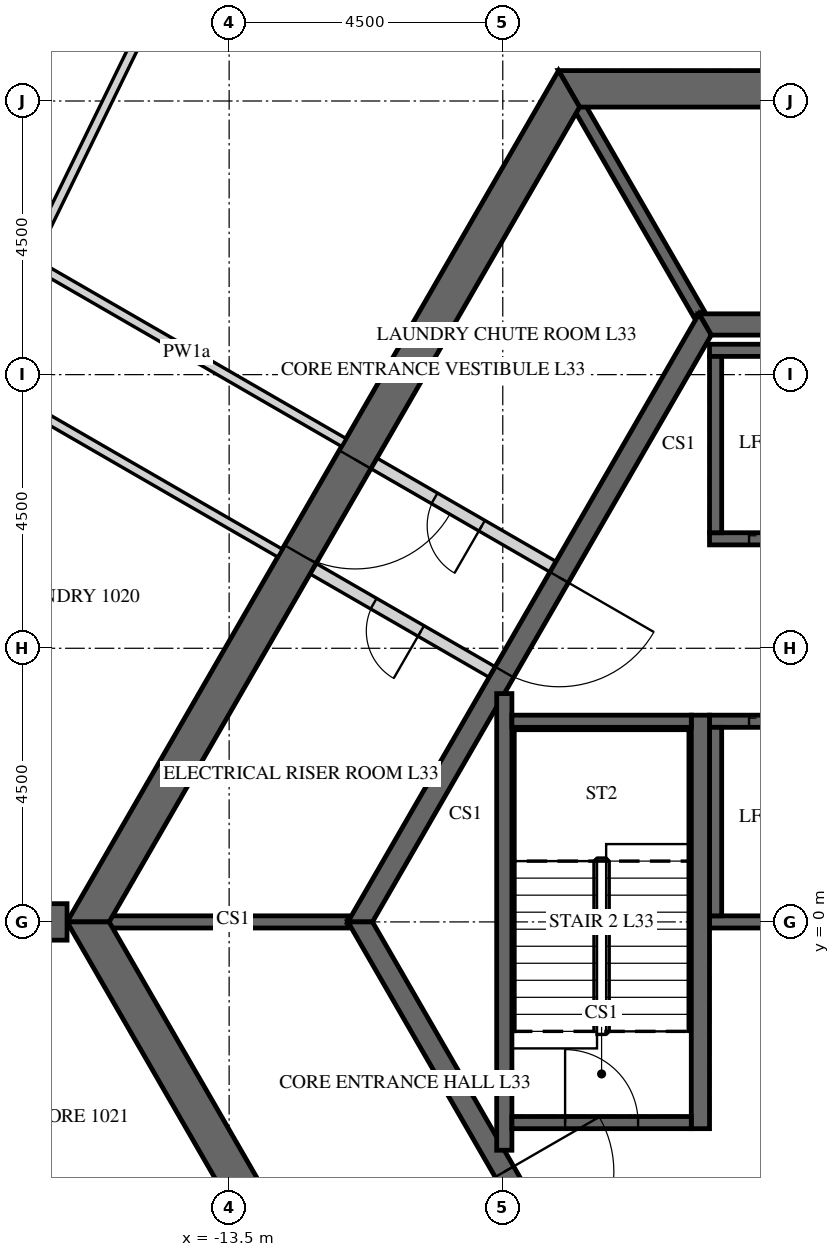
"""IFC4 building model, lengths in metres.
Left out: names, types, materials, properties, quantities, classifications, styles, units other than length and angle.
Written with IfcOpenShell. Run it as: python <this file> out.ifc"""

import sys

from ifc_helpers import new_model, si_unit, direction, frame, frame_2d, origin, place, context, subcontext, project, spatial, polyline, rectangle, outline, extrude, element, fill, save


model = new_model("IFC4")
c1 = context("Model", 3, precision=1e-05, world=origin(), true_north=direction((0.0, 1.0)))
c2 = subcontext(c1, "Body", "Model", "MODEL_VIEW")
j1 = project(units=[si_unit("LENGTHUNIT", "METRE"), si_unit("PLANEANGLEUNIT", "RADIAN")], contexts=[c1])
p1 = place(None, origin())
s1 = spatial("IfcSite", under=j1, at=p1, CompositionType="ELEMENT")
p2 = place(p1, origin())
s2 = spatial("IfcBuilding", under=s1, at=p2, CompositionType="ELEMENT")
p3 = place(p2, frame((0.0, 0.0, 142.8)))
s3 = spatial("IfcBuildingStorey", under=s2, at=p3, CompositionType="ELEMENT", Elevation=142.8)
p4 = place(p3, frame((-7.91, 13.7, -0.15), z_axis=(0.0, 0.0, 1.0), x_axis=(-0.499999880136, -0.866025472988, 0.0)))
e1 = element("IfcWall", 1, at=p4, inside=s3, PredefinedType="SHEAR", context=c2, shape_type="SweptSolid", body=[
    extrude(outline(polyline([(-0.173, -0.3), (15.993, -0.3), (15.646, 0.3), (0.173, 0.3), (-0.173, -0.3)])), origin(), (0.0, 0.0, 1.0), 3.75),
])
p5 = place(p4, frame((7.039, 0.0, 0.15)))
e2 = element("IfcOpeningElement", 2, at=p5, cuts=e1, PredefinedType="OPENING", context=c2, shape_type="SweptSolid", body=[
    extrude(rectangle(XDim=1.8, YDim=2.4, at=frame_2d((0.9, 1.2))), frame((0.0, 0.31, 0.0), z_axis=(0.0, -1.0, 0.0), x_axis=(1.0, 0.0, 0.0)), (0.0, 0.0, 1.0), 0.62),
])
p6 = place(p3, frame((-15.819, 0.0, -0.15), z_axis=(0.0, 0.0, 1.0), x_axis=(0.499999880136, -0.866025472988, 0.0)))
e3 = element("IfcWall", 3, at=p6, inside=s3, PredefinedType="SHEAR", context=c2, shape_type="SweptSolid", body=[
    extrude(outline(polyline([(-0.173, -0.3), (15.993, -0.3), (15.646, 0.3), (0.173, 0.3), (-0.173, -0.3)])), origin(), (0.0, 0.0, 1.0), 3.75),
])
p7 = place(p6, frame((6.981, 0.0, 0.15)))
e4 = element("IfcOpeningElement", 4, at=p7, cuts=e3, PredefinedType="OPENING", context=c2, shape_type="SweptSolid", body=[
    extrude(rectangle(XDim=1.8, YDim=2.4, at=frame_2d((0.9, 1.2))), frame((0.0, 0.31, 0.0), z_axis=(0.0, -1.0, 0.0), x_axis=(1.0, 0.0, 0.0)), (0.0, 0.0, 1.0), 0.62),
])
p8 = place(p3, frame((7.91, 13.7, -0.15), z_axis=(0.0, 0.0, 1.0), x_axis=(-1.0, 0.0, 0.0)))
e5 = element("IfcWall", 5, at=p8, inside=s3, PredefinedType="SHEAR", context=c2, shape_type="SweptSolid", body=[
    extrude(outline(polyline([(-0.173, -0.3), (15.993, -0.3), (15.646, 0.3), (0.173, 0.3), (-0.173, -0.3)])), origin(), (0.0, 0.0, 1.0), 3.75),
])
p9 = place(p8, frame((7.31, 0.0, 0.15)))
e6 = element("IfcOpeningElement", 6, at=p9, cuts=e5, PredefinedType="OPENING", context=c2, shape_type="SweptSolid", body=[
    extrude(rectangle(XDim=1.2, YDim=2.4, at=frame_2d((0.6, 1.2))), frame((0.0, 0.31, 0.0), z_axis=(0.0, -1.0, 0.0), x_axis=(1.0, 0.0, 0.0)), (0.0, 0.0, 1.0), 0.62),
])
p10 = place(p3, frame((-16.166, 0.0, -0.15), z_axis=(0.0, 0.0, 1.0), x_axis=(-1.0, 0.0, 0.0)))
e7 = element("IfcWall", 7, at=p10, inside=s3, PredefinedType="SHEAR", context=c2, shape_type="SweptSolid", body=[
    extrude(rectangle(XDim=16.509, YDim=0.6, at=frame_2d((8.254, 0.0))), origin(), (0.0, 0.0, 1.0), 3.75),
])
p11 = place(p10, frame((7.354, 0.0, 0.15)))
e8 = element("IfcOpeningElement", 8, at=p11, cuts=e7, PredefinedType="OPENING", context=c2, shape_type="SweptSolid", body=[
    extrude(rectangle(XDim=1.8, YDim=2.4, at=frame_2d((0.9, 1.2))), frame((0.0, 0.31, 0.0), z_axis=(0.0, -1.0, 0.0), x_axis=(1.0, 0.0, 0.0)), (0.0, 0.0, 1.0), 0.62),
])
p12 = place(p3, frame((-5.673, 9.825, -0.15), z_axis=(0.0, 0.0, 1.0), x_axis=(-0.499995046907, -0.866028263435, 0.0)))
e9 = element("IfcWall", 9, at=p12, inside=s3, PredefinedType="SHEAR", context=c2, shape_type="SweptSolid", body=[
    extrude(outline(polyline([(-0.101, -0.175), (11.446, -0.175), (11.244, 0.175), (0.101, 0.175), (-0.101, -0.175)])), origin(), (0.0, 0.0, 1.0), 3.75),
])
p13 = place(p12, frame((4.801, 0.0, 0.15)))
e10 = element("IfcOpeningElement", 10, at=p13, cuts=e9, PredefinedType="OPENING", context=c2, shape_type="SweptSolid", body=[
    extrude(rectangle(XDim=1.8, YDim=2.4, at=frame_2d((0.9, 1.2))), frame((0.0, 0.185, 0.0), z_axis=(0.0, -1.0, 0.0), x_axis=(1.0, 0.0, 0.0)), (0.0, 0.0, 1.0), 0.37),
])
p14 = place(p3, frame((-11.345, 0.0, -0.15), z_axis=(0.0, 0.0, 1.0), x_axis=(0.499995046907, -0.866028263435, 0.0)))
e11 = element("IfcWall", 11, at=p14, inside=s3, PredefinedType="SHEAR", context=c2, shape_type="SweptSolid", body=[
    extrude(outline(polyline([(-0.101, -0.175), (11.446, -0.175), (11.244, 0.175), (0.101, 0.175), (-0.101, -0.175)])), origin(), (0.0, 0.0, 1.0), 3.75),
])
p15 = place(p14, frame((4.744, 0.0, 0.15)))
e12 = element("IfcOpeningElement", 12, at=p15, cuts=e11, PredefinedType="OPENING", context=c2, shape_type="SweptSolid", body=[
    extrude(rectangle(XDim=1.8, YDim=2.4, at=frame_2d((0.9, 1.2))), frame((0.0, 0.185, 0.0), z_axis=(0.0, -1.0, 0.0), x_axis=(1.0, 0.0, 0.0)), (0.0, 0.0, 1.0), 0.37),
])
p16 = place(p3, frame((5.673, 9.825, -0.15), z_axis=(0.0, 0.0, 1.0), x_axis=(-1.0, 0.0, 0.0)))
e13 = element("IfcWall", 13, at=p16, inside=s3, PredefinedType="SHEAR", context=c2, shape_type="SweptSolid", body=[
    extrude(outline(polyline([(-0.101, -0.175), (11.446, -0.175), (11.244, 0.175), (0.101, 0.175), (-0.101, -0.175)])), origin(), (0.0, 0.0, 1.0), 3.75),
])
p17 = place(p3, frame((-5.6, 6.3, -0.25), z_axis=(0.0, 0.0, 1.0), x_axis=(1.0, 0.0, 0.0)))
e14 = element("IfcWall", 14, at=p17, inside=s3, PredefinedType="SHEAR", context=c2, shape_type="SweptSolid", body=[
    extrude(rectangle(XDim=11.2, YDim=0.2, at=frame_2d((5.6, 0.0))), origin(), (0.0, 0.0, 1.0), 3.9),
])
p18 = place(p17, frame((0.65, 0.0, 0.25)))
e15 = element("IfcOpeningElement", 15, at=p18, cuts=e14, PredefinedType="OPENING", context=c2, shape_type="SweptSolid", body=[
    extrude(rectangle(XDim=1.1, YDim=2.1, at=frame_2d((0.55, 1.05))), frame((0.0, 0.11, 0.0), z_axis=(0.0, -1.0, 0.0), x_axis=(1.0, 0.0, 0.0)), (0.0, 0.0, 1.0), 0.22),
])
p19 = place(p17, frame((2.85, 0.0, 0.25)))
e16 = element("IfcOpeningElement", 16, at=p19, cuts=e14, PredefinedType="OPENING", context=c2, shape_type="SweptSolid", body=[
    extrude(rectangle(XDim=1.1, YDim=2.1, at=frame_2d((0.55, 1.05))), frame((0.0, 0.11, 0.0), z_axis=(0.0, -1.0, 0.0), x_axis=(1.0, 0.0, 0.0)), (0.0, 0.0, 1.0), 0.22),
])
p20 = place(p17, frame((5.05, 0.0, 0.25)))
e17 = element("IfcOpeningElement", 17, at=p20, cuts=e14, PredefinedType="OPENING", context=c2, shape_type="SweptSolid", body=[
    extrude(rectangle(XDim=1.1, YDim=2.1, at=frame_2d((0.55, 1.05))), frame((0.0, 0.11, 0.0), z_axis=(0.0, -1.0, 0.0), x_axis=(1.0, 0.0, 0.0)), (0.0, 0.0, 1.0), 0.22),
])
p21 = place(p17, frame((7.25, 0.0, 0.25)))
e18 = element("IfcOpeningElement", 18, at=p21, cuts=e14, PredefinedType="OPENING", context=c2, shape_type="SweptSolid", body=[
    extrude(rectangle(XDim=1.1, YDim=2.1, at=frame_2d((0.55, 1.05))), frame((0.0, 0.11, 0.0), z_axis=(0.0, -1.0, 0.0), x_axis=(1.0, 0.0, 0.0)), (0.0, 0.0, 1.0), 0.22),
])
p22 = place(p17, frame((9.45, 0.0, 0.25)))
e19 = element("IfcOpeningElement", 19, at=p22, cuts=e14, PredefinedType="OPENING", context=c2, shape_type="SweptSolid", body=[
    extrude(rectangle(XDim=1.1, YDim=2.1, at=frame_2d((0.55, 1.05))), frame((0.0, 0.11, 0.0), z_axis=(0.0, -1.0, 0.0), x_axis=(1.0, 0.0, 0.0)), (0.0, 0.0, 1.0), 0.22),
])
p23 = place(p3, frame((-5.6, 9.4, -0.25), z_axis=(0.0, 0.0, 1.0), x_axis=(1.0, 0.0, 0.0)))
e20 = element("IfcWall", 20, at=p23, inside=s3, PredefinedType="SHEAR", context=c2, shape_type="SweptSolid", body=[
    extrude(rectangle(XDim=11.2, YDim=0.2, at=frame_2d((5.6, 0.0))), origin(), (0.0, 0.0, 1.0), 3.9),
])
p24 = place(p3, frame((-5.5, 6.4, -0.25), z_axis=(0.0, 0.0, 1.0), x_axis=(0.0, 1.0, 0.0)))
e21 = element("IfcWall", 21, at=p24, inside=s3, PredefinedType="SHEAR", context=c2, shape_type="SweptSolid", body=[
    extrude(rectangle(XDim=2.9, YDim=0.2, at=frame_2d((1.45, 0.0))), origin(), (0.0, 0.0, 1.0), 3.9),
])
p25 = place(p3, frame((-5.6, 3.3, -0.25), z_axis=(0.0, 0.0, 1.0), x_axis=(1.0, 0.0, 0.0)))
e22 = element("IfcWall", 22, at=p25, inside=s3, PredefinedType="SHEAR", context=c2, shape_type="SweptSolid", body=[
    extrude(rectangle(XDim=11.2, YDim=0.2, at=frame_2d((5.6, 0.0))), origin(), (0.0, 0.0, 1.0), 3.9),
])
p26 = place(p25, frame((0.65, 0.0, 0.25)))
e23 = element("IfcOpeningElement", 23, at=p26, cuts=e22, PredefinedType="OPENING", context=c2, shape_type="SweptSolid", body=[
    extrude(rectangle(XDim=1.1, YDim=2.1, at=frame_2d((0.55, 1.05))), frame((0.0, 0.11, 0.0), z_axis=(0.0, -1.0, 0.0), x_axis=(1.0, 0.0, 0.0)), (0.0, 0.0, 1.0), 0.22),
])
p27 = place(p25, frame((2.85, 0.0, 0.25)))
e24 = element("IfcOpeningElement", 24, at=p27, cuts=e22, PredefinedType="OPENING", context=c2, shape_type="SweptSolid", body=[
    extrude(rectangle(XDim=1.1, YDim=2.1, at=frame_2d((0.55, 1.05))), frame((0.0, 0.11, 0.0), z_axis=(0.0, -1.0, 0.0), x_axis=(1.0, 0.0, 0.0)), (0.0, 0.0, 1.0), 0.22),
])
p28 = place(p25, frame((5.05, 0.0, 0.25)))
e25 = element("IfcOpeningElement", 25, at=p28, cuts=e22, PredefinedType="OPENING", context=c2, shape_type="SweptSolid", body=[
    extrude(rectangle(XDim=1.1, YDim=2.1, at=frame_2d((0.55, 1.05))), frame((0.0, 0.11, 0.0), z_axis=(0.0, -1.0, 0.0), x_axis=(1.0, 0.0, 0.0)), (0.0, 0.0, 1.0), 0.22),
])
p29 = place(p25, frame((7.25, 0.0, 0.25)))
e26 = element("IfcOpeningElement", 26, at=p29, cuts=e22, PredefinedType="OPENING", context=c2, shape_type="SweptSolid", body=[
    extrude(rectangle(XDim=1.1, YDim=2.1, at=frame_2d((0.55, 1.05))), frame((0.0, 0.11, 0.0), z_axis=(0.0, -1.0, 0.0), x_axis=(1.0, 0.0, 0.0)), (0.0, 0.0, 1.0), 0.22),
])
p30 = place(p25, frame((9.45, 0.0, 0.25)))
e27 = element("IfcOpeningElement", 27, at=p30, cuts=e22, PredefinedType="OPENING", context=c2, shape_type="SweptSolid", body=[
    extrude(rectangle(XDim=1.1, YDim=2.1, at=frame_2d((0.55, 1.05))), frame((0.0, 0.11, 0.0), z_axis=(0.0, -1.0, 0.0), x_axis=(1.0, 0.0, 0.0)), (0.0, 0.0, 1.0), 0.22),
])
p31 = place(p3, frame((-5.6, 0.0, -0.25), z_axis=(0.0, 0.0, 1.0), x_axis=(1.0, 0.0, 0.0)))
e28 = element("IfcWall", 28, at=p31, inside=s3, PredefinedType="SHEAR", context=c2, shape_type="SweptSolid", body=[
    extrude(rectangle(XDim=11.2, YDim=0.2, at=frame_2d((5.6, 0.0))), origin(), (0.0, 0.0, 1.0), 3.9),
])
p32 = place(p3, frame((-5.5, 0.1, -0.25), z_axis=(0.0, 0.0, 1.0), x_axis=(0.0, 1.0, 0.0)))
e29 = element("IfcWall", 29, at=p32, inside=s3, PredefinedType="SHEAR", context=c2, shape_type="SweptSolid", body=[
    extrude(rectangle(XDim=3.1, YDim=0.2, at=frame_2d((1.55, 0.0))), origin(), (0.0, 0.0, 1.0), 3.9),
])
p33 = place(p3, frame((-5.773, 10.0, -0.15), z_axis=(0.0, 0.0, 1.0), x_axis=(-0.500038251005, 0.86600331843, 0.0)))
e30 = element("IfcWall", 30, at=p33, inside=s3, PredefinedType="SHEAR", context=c2, shape_type="SweptSolid", body=[
    extrude(rectangle(XDim=3.926, YDim=0.2, at=frame_2d((1.963, 0.0))), origin(), (0.0, 0.0, 1.0), 3.75),
])
p34 = place(p3, frame((-11.547, 0.0, -0.15), z_axis=(0.0, 0.0, 1.0), x_axis=(-1.0, 0.0, 0.0)))
e31 = element("IfcWall", 31, at=p34, inside=s3, PredefinedType="SHEAR", context=c2, shape_type="SweptSolid", body=[
    extrude(rectangle(XDim=3.926, YDim=0.2, at=frame_2d((1.963, 0.0))), origin(), (0.0, 0.0, 1.0), 3.75),
])
p35 = place(p3, frame((-9.175, 4.109, 0.0), z_axis=(0.0, 0.0, 1.0), x_axis=(-0.865989465428, 0.500062241894, 0.0)))
e32 = element("IfcWall", 32, at=p35, inside=s3, PredefinedType="PARTITIONING", context=c2, shape_type="SweptSolid", body=[
    extrude(rectangle(XDim=3.4, YDim=0.2, at=frame_2d((1.7, 0.0))), origin(), (0.0, 0.0, 1.0), 3.65),
])
p36 = place(p35, frame((1.351, 0.0, 0.0)))
e33 = element("IfcOpeningElement", 33, at=p36, cuts=e32, PredefinedType="OPENING", context=c2, shape_type="SweptSolid", body=[
    extrude(rectangle(XDim=0.9, YDim=2.1, at=frame_2d((0.45, 1.05))), frame((0.0, 0.11, 0.0), z_axis=(0.0, -1.0, 0.0), x_axis=(1.0, 0.0, 0.0)), (0.0, 0.0, 1.0), 0.22),
])
p37 = place(p3, frame((-8.175, 5.841, 0.0), z_axis=(0.0, 0.0, 1.0), x_axis=(-0.866020560687, 0.500008388397, 0.0)))
e34 = element("IfcWall", 34, at=p37, inside=s3, PredefinedType="PARTITIONING", context=c2, shape_type="SweptSolid", body=[
    extrude(rectangle(XDim=3.4, YDim=0.2, at=frame_2d((1.7, 0.0))), origin(), (0.0, 0.0, 1.0), 3.65),
])
p38 = place(p37, frame((1.35, 0.0, 0.0)))
e35 = element("IfcOpeningElement", 35, at=p38, cuts=e34, PredefinedType="OPENING", context=c2, shape_type="SweptSolid", body=[
    extrude(rectangle(XDim=0.9, YDim=2.1, at=frame_2d((0.45, 1.05))), frame((0.0, 0.11, 0.0), z_axis=(0.0, -1.0, 0.0), x_axis=(1.0, 0.0, 0.0)), (0.0, 0.0, 1.0), 0.22),
])
p39 = place(p3, frame((-5.75, -3.4, -0.25), z_axis=(0.0, 0.0, 1.0), x_axis=(0.0, 1.0, 0.0)))
e36 = element("IfcWall", 36, at=p39, inside=s3, PredefinedType="SHEAR", context=c2, shape_type="SweptSolid", body=[
    extrude(rectangle(XDim=6.8, YDim=0.3, at=frame_2d((3.4, 0.0))), origin(), (0.0, 0.0, 1.0), 3.9),
])
p40 = place(p3, frame((-8.975, -3.755, -0.25), z_axis=(0.0, 0.0, 1.0), x_axis=(0.0, 1.0, 0.0)))
e37 = element("IfcWall", 37, at=p40, inside=s3, PredefinedType="SHEAR", context=c2, shape_type="SweptSolid", body=[
    extrude(rectangle(XDim=7.51, YDim=0.25, at=frame_2d((3.755, 0.0))), origin(), (0.0, 0.0, 1.0), 3.9),
])
p41 = place(p3, frame((-8.85, 3.3, -0.25), z_axis=(0.0, 0.0, 1.0), x_axis=(1.0, 0.0, 0.0)))
e38 = element("IfcWall", 38, at=p41, inside=s3, PredefinedType="SHEAR", context=c2, shape_type="SweptSolid", body=[
    extrude(rectangle(XDim=2.95, YDim=0.2, at=frame_2d((1.475, 0.0))), origin(), (0.0, 0.0, 1.0), 3.9),
])
p42 = place(p3, frame((-8.85, -3.3, -0.25), z_axis=(0.0, 0.0, 1.0), x_axis=(1.0, 0.0, 0.0)))
e39 = element("IfcWall", 39, at=p42, inside=s3, PredefinedType="SHEAR", context=c2, shape_type="SweptSolid", body=[
    extrude(rectangle(XDim=2.95, YDim=0.2, at=frame_2d((1.475, 0.0))), origin(), (0.0, 0.0, 1.0), 3.9),
])
p43 = place(p42, frame((0.875, 0.0, 0.25)))
e40 = element("IfcOpeningElement", 40, at=p43, cuts=e39, PredefinedType="OPENING", context=c2, shape_type="SweptSolid", body=[
    extrude(rectangle(XDim=1.2, YDim=2.4, at=frame_2d((0.6, 1.2))), frame((0.0, 0.11, 0.0), z_axis=(0.0, -1.0, 0.0), x_axis=(1.0, 0.0, 0.0)), (0.0, 0.0, 1.0), 0.22),
])
p44 = place(p3, frame((-13.565, 21.575, 0.0), z_axis=(0.0, 0.0, 1.0), x_axis=(-0.438378393111, -0.898790511996, 0.0)))
e41 = element("IfcWall", 41, at=p44, inside=s3, PredefinedType="PARTITIONING", context=c2, shape_type="SweptSolid", body=[
    extrude(rectangle(XDim=21.584, YDim=0.15, at=frame_2d((10.792, 0.0))), origin(), (0.0, 0.0, 1.0), 2.838),
])
p45 = place(p44, frame((0.775, 0.0, 0.0)))
e42 = element("IfcOpeningElement", 42, at=p45, cuts=e41, PredefinedType="OPENING", context=c2, shape_type="SweptSolid", body=[
    extrude(rectangle(XDim=1.0, YDim=2.1, at=frame_2d((0.5, 1.05))), frame((0.0, 0.085, 0.0), z_axis=(0.0, -1.0, 0.0), x_axis=(1.0, 0.0, 0.0)), (0.0, 0.0, 1.0), 0.17),
])
p46 = place(p44, frame((11.134, 0.0, 0.0)))
e43 = element("IfcOpeningElement", 43, at=p46, cuts=e41, PredefinedType="OPENING", context=c2, shape_type="SweptSolid", body=[
    extrude(rectangle(XDim=1.0, YDim=2.1, at=frame_2d((0.5, 1.05))), frame((0.0, 0.085, 0.0), z_axis=(0.0, -1.0, 0.0), x_axis=(1.0, 0.0, 0.0)), (0.0, 0.0, 1.0), 0.17),
])
p47 = place(p44, frame((16.801, 0.0, 0.0)))
e44 = element("IfcOpeningElement", 44, at=p47, cuts=e41, PredefinedType="OPENING", context=c2, shape_type="SweptSolid", body=[
    extrude(rectangle(XDim=1.0, YDim=2.1, at=frame_2d((0.5, 1.05))), frame((0.0, 0.085, 0.0), z_axis=(0.0, -1.0, 0.0), x_axis=(1.0, 0.0, 0.0)), (0.0, 0.0, 1.0), 0.17),
])
p48 = place(p3, frame((-11.614, 7.884, 0.0), z_axis=(0.0, 0.0, 1.0), x_axis=(-0.866017375886, 0.50001390447, 0.0)))
e45 = element("IfcWall", 45, at=p48, inside=s3, PredefinedType="PARTITIONING", context=c2, shape_type="SweptSolid", body=[
    extrude(rectangle(XDim=5.97, YDim=0.15, at=frame_2d((2.985, 0.0))), origin(), (0.0, 0.0, 1.0), 2.838),
])
p49 = place(p3, frame((-16.751, 10.937, 0.0), z_axis=(0.0, 0.0, 1.0), x_axis=(0.438378523504, 0.898790448397, 0.0)))
e46 = element("IfcWall", 46, at=p49, inside=s3, PredefinedType="PARTITIONING", context=c2, shape_type="SweptSolid", body=[
    extrude(rectangle(XDim=9.917, YDim=0.15, at=frame_2d((4.958, 0.0))), origin(), (0.0, 0.0, 1.0), 2.838),
])
p50 = place(p3, frame((-17.642, 8.94, 0.0), z_axis=(0.0, 0.0, 1.0), x_axis=(0.866017948234, -0.500012913169, 0.0)))
e47 = element("IfcWall", 47, at=p50, inside=s3, PredefinedType="PARTITIONING", context=c2, shape_type="SweptSolid", body=[
    extrude(rectangle(XDim=5.748, YDim=0.15, at=frame_2d((2.874, 0.0))), origin(), (0.0, 0.0, 1.0), 2.838),
])
p51 = place(p3, frame((-23.743, -2.175, 0.0), z_axis=(0.0, 0.0, 1.0), x_axis=(0.499992353047, -0.86602981871, 0.0)))
e48 = element("IfcWall", 48, at=p51, inside=s3, PredefinedType="PARTITIONING", context=c2, shape_type="SweptSolid", body=[
    extrude(rectangle(XDim=23.516, YDim=0.15, at=frame_2d((11.758, 0.0))), origin(), (0.0, 0.0, 1.0), 2.838),
])
p52 = place(p51, frame((10.099, 0.0, 0.0)))
e49 = element("IfcOpeningElement", 49, at=p52, cuts=e48, PredefinedType="OPENING", context=c2, shape_type="SweptSolid", body=[
    extrude(rectangle(XDim=1.0, YDim=2.1, at=frame_2d((0.5, 1.05))), frame((0.0, 0.085, 0.0), z_axis=(0.0, -1.0, 0.0), x_axis=(1.0, 0.0, 0.0)), (0.0, 0.0, 1.0), 0.17),
])
p53 = place(p51, frame((17.358, 0.0, 0.0)))
e50 = element("IfcOpeningElement", 50, at=p53, cuts=e48, PredefinedType="OPENING", context=c2, shape_type="SweptSolid", body=[
    extrude(rectangle(XDim=1.0, YDim=2.1, at=frame_2d((0.5, 1.05))), frame((0.0, 0.085, 0.0), z_axis=(0.0, -1.0, 0.0), x_axis=(1.0, 0.0, 0.0)), (0.0, 0.0, 1.0), 0.17),
])
p54 = place(p5, origin())
e51 = element("IfcDoor", 51, at=p54, inside=s3, OperationType="DOUBLE_DOOR_SINGLE_SWING", PredefinedType="DOOR", context=c2, shape_type="SweptSolid", body=[
    extrude(rectangle(XDim=1.8, YDim=2.4, at=frame_2d((0.9, 1.2))), frame((0.0, 0.025, 0.0), z_axis=(0.0, -1.0, 0.0), x_axis=(1.0, 0.0, 0.0)), (0.0, 0.0, 1.0), 0.05),
])
fill(e2, e51)
p55 = place(p13, origin())
e52 = element("IfcDoor", 52, at=p55, inside=s3, OperationType="DOUBLE_DOOR_SINGLE_SWING", PredefinedType="DOOR", context=c2, shape_type="SweptSolid", body=[
    extrude(rectangle(XDim=1.8, YDim=2.4, at=frame_2d((0.9, 1.2))), frame((0.0, 0.025, 0.0), z_axis=(0.0, -1.0, 0.0), x_axis=(1.0, 0.0, 0.0)), (0.0, 0.0, 1.0), 0.05),
])
fill(e10, e52)
p56 = place(p15, origin())
e53 = element("IfcDoor", 53, at=p56, inside=s3, OperationType="DOUBLE_DOOR_SINGLE_SWING", PredefinedType="DOOR", context=c2, shape_type="SweptSolid", body=[
    extrude(rectangle(XDim=1.8, YDim=2.4, at=frame_2d((0.9, 1.2))), frame((0.0, 0.025, 0.0), z_axis=(0.0, -1.0, 0.0), x_axis=(1.0, 0.0, 0.0)), (0.0, 0.0, 1.0), 0.05),
])
fill(e12, e53)
p57 = place(p36, origin())
e54 = element("IfcDoor", 54, at=p57, inside=s3, OperationType="SINGLE_SWING_LEFT", PredefinedType="DOOR", context=c2, shape_type="SweptSolid", body=[
    extrude(rectangle(XDim=0.9, YDim=2.1, at=frame_2d((0.45, 1.05))), frame((0.0, 0.025, 0.0), z_axis=(0.0, -1.0, 0.0), x_axis=(1.0, 0.0, 0.0)), (0.0, 0.0, 1.0), 0.05),
])
fill(e33, e54)
p58 = place(p38, origin())
e55 = element("IfcDoor", 55, at=p58, inside=s3, OperationType="SINGLE_SWING_LEFT", PredefinedType="DOOR", context=c2, shape_type="SweptSolid", body=[
    extrude(rectangle(XDim=0.9, YDim=2.1, at=frame_2d((0.45, 1.05))), frame((0.0, 0.025, 0.0), z_axis=(0.0, -1.0, 0.0), x_axis=(1.0, 0.0, 0.0)), (0.0, 0.0, 1.0), 0.05),
])
fill(e35, e55)
p59 = place(p43, origin())
e56 = element("IfcDoor", 56, at=p59, inside=s3, OperationType="SINGLE_SWING_LEFT", PredefinedType="DOOR", context=c2, shape_type="SweptSolid", body=[
    extrude(rectangle(XDim=1.2, YDim=2.4, at=frame_2d((0.6, 1.2))), frame((0.0, 0.025, 0.0), z_axis=(0.0, -1.0, 0.0), x_axis=(1.0, 0.0, 0.0)), (0.0, 0.0, 1.0), 0.05),
])
fill(e40, e56)
p60 = place(p18, origin())
e57 = element("IfcDoor", 57, at=p60, inside=s3, OperationType="SLIDING_TO_LEFT", PredefinedType="DOOR", context=c2, shape_type="SweptSolid", body=[
    extrude(rectangle(XDim=1.1, YDim=2.1, at=frame_2d((0.55, 1.05))), frame((0.0, 0.025, 0.0), z_axis=(0.0, -1.0, 0.0), x_axis=(1.0, 0.0, 0.0)), (0.0, 0.0, 1.0), 0.05),
])
fill(e15, e57)
p61 = place(p26, origin())
e58 = element("IfcDoor", 58, at=p61, inside=s3, OperationType="SLIDING_TO_LEFT", PredefinedType="DOOR", context=c2, shape_type="SweptSolid", body=[
    extrude(rectangle(XDim=1.1, YDim=2.1, at=frame_2d((0.55, 1.05))), frame((0.0, 0.025, 0.0), z_axis=(0.0, -1.0, 0.0), x_axis=(1.0, 0.0, 0.0)), (0.0, 0.0, 1.0), 0.05),
])
fill(e23, e58)
save(model, sys.argv[1])
